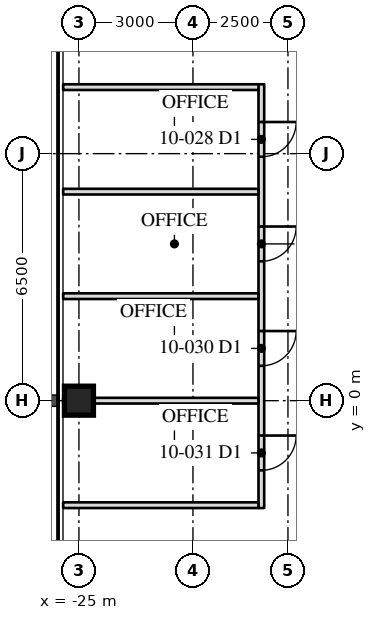
"""IFC4 building model, lengths in metres.
Left out: names, types, materials, properties, quantities, classifications, styles, units other than length and angle.
Written with IfcOpenShell. Run it as: python <this file> out.ifc"""

import sys

from ifc_helpers import new_model, si_unit, direction, frame, frame_2d, origin, origin_2d, place, context, subcontext, project, spatial, rectangle, hollow_rectangle, extrude, element, fill, save


model = new_model("IFC4")
c1 = context("Model", 3, precision=1e-05, world=origin(), true_north=direction((0.0, 1.0)))
c2 = subcontext(c1, "Body", "Model", "MODEL_VIEW")
j1 = project(units=[si_unit("LENGTHUNIT", "METRE"), si_unit("PLANEANGLEUNIT", "RADIAN")], contexts=[c1])
p1 = place(None, origin())
s1 = spatial("IfcSite", under=j1, at=p1, CompositionType="ELEMENT")
p2 = place(p1, origin())
s2 = spatial("IfcBuilding", under=s1, at=p2, CompositionType="ELEMENT")
p3 = place(p2, frame((0.0, 0.0, 44.7)))
s3 = spatial("IfcBuildingStorey", under=s2, at=p3, CompositionType="ELEMENT", Elevation=44.7)
p4 = place(p3, frame((-25.0, 0.0, 0.0), z_axis=(0.0, 0.0, 1.0), x_axis=(0.0, 1.0, 0.0)))
e1 = element("IfcColumn", 1, at=p4, inside=s3, PredefinedType="COLUMN", context=c2, shape_type="SweptSolid", body=[
    extrude(hollow_rectangle(XDim=0.762, YDim=0.762, WallThickness=0.127, at=origin_2d()), origin(), (0.0, 0.0, 1.0), 4.1),
])
p5 = place(p3, frame((-20.2, 8.325, 0.0), z_axis=(0.0, 0.0, 1.0), x_axis=(0.0, -1.0, 0.0)))
e2 = element("IfcWall", 2, at=p5, inside=s3, PredefinedType="PARTITIONING", context=c2, shape_type="SweptSolid", body=[
    extrude(rectangle(XDim=11.15, YDim=0.15, at=frame_2d((5.575, 0.0))), origin(), (0.0, 0.0, 1.0), 3.91),
])
p6 = place(p5, frame((0.992, 0.0, 0.0)))
e3 = element("IfcOpeningElement", 3, at=p6, cuts=e2, PredefinedType="OPENING", context=c2, shape_type="SweptSolid", body=[
    extrude(rectangle(XDim=0.915, YDim=2.134, at=frame_2d((0.458, 1.067))), frame((0.0, 0.085, 0.0), z_axis=(0.0, -1.0, 0.0), x_axis=(1.0, 0.0, 0.0)), (0.0, 0.0, 1.0), 0.17),
])
p7 = place(p5, frame((3.742, 0.0, 0.0)))
e4 = element("IfcOpeningElement", 4, at=p7, cuts=e2, PredefinedType="OPENING", context=c2, shape_type="SweptSolid", body=[
    extrude(rectangle(XDim=0.915, YDim=2.134, at=frame_2d((0.458, 1.067))), frame((0.0, 0.085, 0.0), z_axis=(0.0, -1.0, 0.0), x_axis=(1.0, 0.0, 0.0)), (0.0, 0.0, 1.0), 0.17),
])
p8 = place(p5, frame((6.492, 0.0, 0.0)))
e5 = element("IfcOpeningElement", 5, at=p8, cuts=e2, PredefinedType="OPENING", context=c2, shape_type="SweptSolid", body=[
    extrude(rectangle(XDim=0.915, YDim=2.134, at=frame_2d((0.458, 1.067))), frame((0.0, 0.085, 0.0), z_axis=(0.0, -1.0, 0.0), x_axis=(1.0, 0.0, 0.0)), (0.0, 0.0, 1.0), 0.17),
])
p9 = place(p5, frame((9.242, 0.0, 0.0)))
e6 = element("IfcOpeningElement", 6, at=p9, cuts=e2, PredefinedType="OPENING", context=c2, shape_type="SweptSolid", body=[
    extrude(rectangle(XDim=0.915, YDim=2.134, at=frame_2d((0.458, 1.067))), frame((0.0, 0.085, 0.0), z_axis=(0.0, -1.0, 0.0), x_axis=(1.0, 0.0, 0.0)), (0.0, 0.0, 1.0), 0.17),
])
for number, where, z_axis, x_axis in (
    (7, (-20.275, 8.25, 0.0), (0.0, 0.0, 1.0), (-1.0, 0.0, 0.0)),
    (8, (-20.275, 5.5, 0.0), (0.0, 0.0, 1.0), (-1.0, 0.0, 0.0)),
    (9, (-20.275, 2.75, 0.0), (0.0, 0.0, 1.0), (-1.0, 0.0, 0.0)),
):
    element("IfcWall", number, at=place(p3, frame(where, z_axis=z_axis, x_axis=x_axis)), inside=s3, PredefinedType="PARTITIONING", context=c2, shape_type="SweptSolid", body=[
        extrude(rectangle(XDim=5.14, YDim=0.15, at=frame_2d((2.57, 0.0))), origin(), (0.0, 0.0, 1.0), 3.91),
    ])
p10 = place(p3, frame((-20.275, 0.0, 0.0), z_axis=(0.0, 0.0, 1.0), x_axis=(-1.0, 0.0, 0.0)))
e10 = element("IfcWall", 10, at=p10, inside=s3, PredefinedType="PARTITIONING", context=c2, shape_type="SweptSolid", body=[
    extrude(rectangle(XDim=5.14, YDim=0.15, at=frame_2d((2.57, 0.0))), origin(), (0.0, 0.0, 1.0), 3.13),
])
p11 = place(p3, frame((-20.275, -2.75, 0.0), z_axis=(0.0, 0.0, 1.0), x_axis=(-1.0, 0.0, 0.0)))
e11 = element("IfcWall", 11, at=p11, inside=s3, PredefinedType="PARTITIONING", context=c2, shape_type="SweptSolid", body=[
    extrude(rectangle(XDim=5.14, YDim=0.15, at=frame_2d((2.57, 0.0))), origin(), (0.0, 0.0, 1.0), 3.91),
])
p12 = place(p6, origin())
e12 = element("IfcDoor", 12, at=p12, inside=s3, OperationType="SINGLE_SWING_LEFT", PredefinedType="DOOR", context=c2, shape_type="SweptSolid", body=[
    extrude(rectangle(XDim=0.915, YDim=2.134, at=frame_2d((0.458, 1.067))), frame((0.0, 0.025, 0.0), z_axis=(0.0, -1.0, 0.0), x_axis=(1.0, 0.0, 0.0)), (0.0, 0.0, 1.0), 0.05),
])
fill(e3, e12)
p13 = place(p7, origin())
e13 = element("IfcDoor", 13, at=p13, inside=s3, OperationType="SINGLE_SWING_LEFT", PredefinedType="DOOR", context=c2, shape_type="SweptSolid", body=[
    extrude(rectangle(XDim=0.915, YDim=2.134, at=frame_2d((0.458, 1.067))), frame((0.0, 0.025, 0.0), z_axis=(0.0, -1.0, 0.0), x_axis=(1.0, 0.0, 0.0)), (0.0, 0.0, 1.0), 0.05),
])
fill(e4, e13)
p14 = place(p8, origin())
e14 = element("IfcDoor", 14, at=p14, inside=s3, OperationType="SINGLE_SWING_LEFT", PredefinedType="DOOR", context=c2, shape_type="SweptSolid", body=[
    extrude(rectangle(XDim=0.915, YDim=2.134, at=frame_2d((0.458, 1.067))), frame((0.0, 0.025, 0.0), z_axis=(0.0, -1.0, 0.0), x_axis=(1.0, 0.0, 0.0)), (0.0, 0.0, 1.0), 0.05),
])
fill(e5, e14)
p15 = place(p9, origin())
e15 = element("IfcDoor", 15, at=p15, inside=s3, OperationType="SINGLE_SWING_LEFT", PredefinedType="DOOR", context=c2, shape_type="SweptSolid", body=[
    extrude(rectangle(XDim=0.915, YDim=2.134, at=frame_2d((0.458, 1.067))), frame((0.0, 0.025, 0.0), z_axis=(0.0, -1.0, 0.0), x_axis=(1.0, 0.0, 0.0)), (0.0, 0.0, 1.0), 0.05),
])
fill(e6, e15)
save(model, sys.argv[1])
